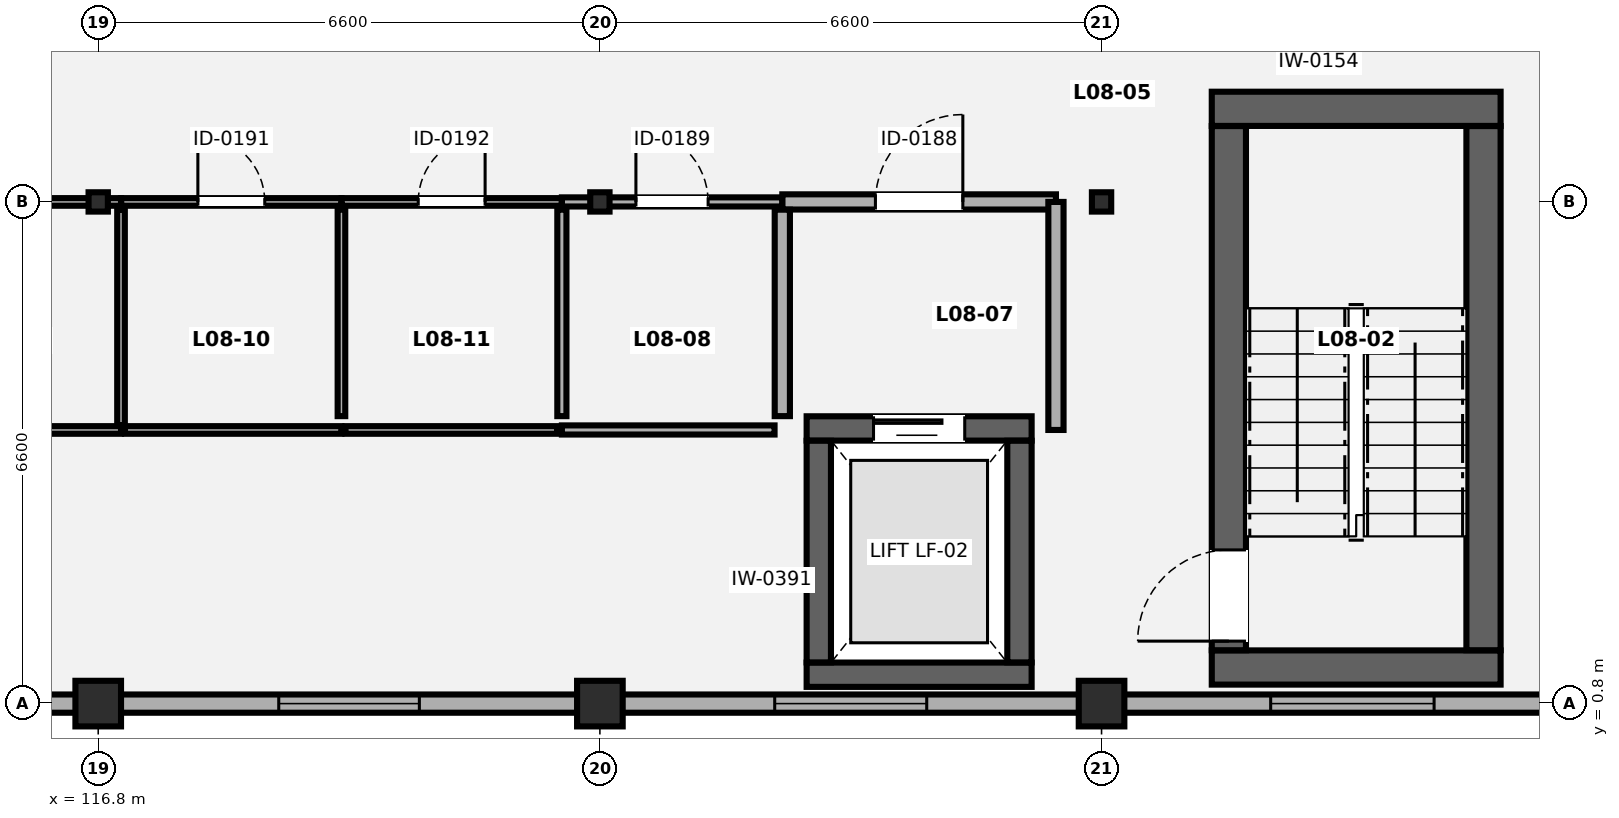
"""IFC4 building model, lengths in metres.
Left out: names, types, materials, properties, quantities, classifications, styles, units other than length and angle.
Written with IfcOpenShell. Run it as: python <this file> out.ifc"""

import sys

from ifc_helpers import new_model, si_unit, direction, frame, frame_2d, origin, origin_2d, place, context, subcontext, project, spatial, rectangle, circle, i_section, extrude, element, fill, save


model = new_model("IFC4")
c1 = context("Model", 3, precision=1e-05, world=origin(), true_north=direction((0.0, 1.0)))
c2 = subcontext(c1, "Body", "Model", "MODEL_VIEW")
j1 = project(units=[si_unit("LENGTHUNIT", "METRE"), si_unit("PLANEANGLEUNIT", "RADIAN")], contexts=[c1])
p1 = place(None, origin())
s1 = spatial("IfcSite", under=j1, at=p1, CompositionType="ELEMENT")
p2 = place(p1, origin())
s2 = spatial("IfcBuilding", under=s1, at=p2, CompositionType="ELEMENT")
p3 = place(p2, frame((0.0, 0.0, 34.3)))
s3 = spatial("IfcBuildingStorey", under=s2, at=p3, CompositionType="ELEMENT", Elevation=34.3)
p4 = place(p3, frame((116.8, 0.8, 0.0), z_axis=(0.0, 0.0, 1.0), x_axis=(1.0, 0.0, 0.0)))
e1 = element("IfcColumn", 1, at=p4, inside=s3, PredefinedType="PILASTER", context=c2, shape_type="SweptSolid", body=[
    extrude(circle(Radius=0.3, at=origin_2d()), origin(), (0.0, 0.0, 1.0), 3.85),
])
p5 = place(p3, frame((116.8, 7.4, 0.0), z_axis=(0.0, 0.0, 1.0), x_axis=(1.0, 0.0, 0.0)))
e2 = element("IfcColumn", 2, at=p5, inside=s3, PredefinedType="COLUMN", context=c2, shape_type="SweptSolid", body=[
    extrude(i_section(OverallWidth=0.254, OverallDepth=0.254, WebThickness=0.009, FlangeThickness=0.014, FilletRadius=0.014, at=origin_2d()), origin(), (0.0, 0.0, 1.0), 3.85),
])
p6 = place(p3, frame((123.4, 0.8, 0.0), z_axis=(0.0, 0.0, 1.0), x_axis=(1.0, 0.0, 0.0)))
e3 = element("IfcColumn", 3, at=p6, inside=s3, PredefinedType="PILASTER", context=c2, shape_type="SweptSolid", body=[
    extrude(circle(Radius=0.3, at=origin_2d()), origin(), (0.0, 0.0, 1.0), 3.85),
])
p7 = place(p3, frame((123.4, 7.4, 0.0), z_axis=(0.0, 0.0, 1.0), x_axis=(1.0, 0.0, 0.0)))
e4 = element("IfcColumn", 4, at=p7, inside=s3, PredefinedType="COLUMN", context=c2, shape_type="SweptSolid", body=[
    extrude(i_section(OverallWidth=0.254, OverallDepth=0.254, WebThickness=0.009, FlangeThickness=0.014, FilletRadius=0.014, at=origin_2d()), origin(), (0.0, 0.0, 1.0), 3.85),
])
p8 = place(p3, frame((130.0, 0.8, 0.0), z_axis=(0.0, 0.0, 1.0), x_axis=(1.0, 0.0, 0.0)))
e5 = element("IfcColumn", 5, at=p8, inside=s3, PredefinedType="PILASTER", context=c2, shape_type="SweptSolid", body=[
    extrude(circle(Radius=0.3, at=origin_2d()), origin(), (0.0, 0.0, 1.0), 3.85),
])
p9 = place(p3, frame((130.0, 7.4, 0.0), z_axis=(0.0, 0.0, 1.0), x_axis=(1.0, 0.0, 0.0)))
e6 = element("IfcColumn", 6, at=p9, inside=s3, PredefinedType="COLUMN", context=c2, shape_type="SweptSolid", body=[
    extrude(i_section(OverallWidth=0.254, OverallDepth=0.254, WebThickness=0.009, FlangeThickness=0.014, FilletRadius=0.014, at=origin_2d()), origin(), (0.0, 0.0, 1.0), 3.85),
])
p10 = place(p3, frame((149.502, 0.8, 0.0), z_axis=(0.0, 0.0, 1.0), x_axis=(-1.0, 0.0, 0.0)))
e7 = element("IfcWall", 7, at=p10, inside=s3, PredefinedType="SOLIDWALL", context=c2, shape_type="SweptSolid", body=[
    extrude(rectangle(XDim=45.604, YDim=0.24, at=frame_2d((22.802, 0.0))), origin(), (0.0, 0.0, 1.0), 3.155),
])
p11 = place(p10, frame((41.827, 0.0, 0.85)))
e8 = element("IfcOpeningElement", 8, at=p11, cuts=e7, PredefinedType="OPENING", context=c2, shape_type="SweptSolid", body=[
    extrude(rectangle(XDim=1.55, YDim=1.4, at=frame_2d((0.775, 0.7))), frame((0.0, 0.13, 0.0), z_axis=(0.0, -1.0, 0.0), x_axis=(1.0, 0.0, 0.0)), (0.0, 0.0, 1.0), 0.26),
])
p12 = place(p10, frame((35.152, 0.0, 0.85)))
e9 = element("IfcOpeningElement", 9, at=p12, cuts=e7, PredefinedType="OPENING", context=c2, shape_type="SweptSolid", body=[
    extrude(rectangle(XDim=1.7, YDim=1.4, at=frame_2d((0.85, 0.7))), frame((0.0, 0.13, 0.0), z_axis=(0.0, -1.0, 0.0), x_axis=(1.0, 0.0, 0.0)), (0.0, 0.0, 1.0), 0.26),
])
p13 = place(p10, frame((28.477, 0.0, 0.85)))
e10 = element("IfcOpeningElement", 10, at=p13, cuts=e7, PredefinedType="OPENING", context=c2, shape_type="SweptSolid", body=[
    extrude(rectangle(XDim=1.85, YDim=1.4, at=frame_2d((0.925, 0.7))), frame((0.0, 0.13, 0.0), z_axis=(0.0, -1.0, 0.0), x_axis=(1.0, 0.0, 0.0)), (0.0, 0.0, 1.0), 0.26),
])
p14 = place(p10, frame((21.802, 0.0, 0.85)))
e11 = element("IfcOpeningElement", 11, at=p14, cuts=e7, PredefinedType="OPENING", context=c2, shape_type="SweptSolid", body=[
    extrude(rectangle(XDim=2.0, YDim=1.4, at=frame_2d((1.0, 0.7))), frame((0.0, 0.13, 0.0), z_axis=(0.0, -1.0, 0.0), x_axis=(1.0, 0.0, 0.0)), (0.0, 0.0, 1.0), 0.26),
])
p15 = place(p10, frame((15.127, 0.0, 0.85)))
e12 = element("IfcOpeningElement", 12, at=p15, cuts=e7, PredefinedType="OPENING", context=c2, shape_type="SweptSolid", body=[
    extrude(rectangle(XDim=2.15, YDim=1.4, at=frame_2d((1.075, 0.7))), frame((0.0, 0.13, 0.0), z_axis=(0.0, -1.0, 0.0), x_axis=(1.0, 0.0, 0.0)), (0.0, 0.0, 1.0), 0.26),
])
p16 = place(p10, frame((8.452, 0.0, 0.85)))
e13 = element("IfcOpeningElement", 13, at=p16, cuts=e7, PredefinedType="OPENING", context=c2, shape_type="SweptSolid", body=[
    extrude(rectangle(XDim=2.3, YDim=1.4, at=frame_2d((1.15, 0.7))), frame((0.0, 0.13, 0.0), z_axis=(0.0, -1.0, 0.0), x_axis=(1.0, 0.0, 0.0)), (0.0, 0.0, 1.0), 0.26),
])
p17 = place(p10, frame((1.777, 0.0, 0.85)))
e14 = element("IfcOpeningElement", 14, at=p17, cuts=e7, PredefinedType="OPENING", context=c2, shape_type="SweptSolid", body=[
    extrude(rectangle(XDim=2.45, YDim=1.4, at=frame_2d((1.225, 0.7))), frame((0.0, 0.13, 0.0), z_axis=(0.0, -1.0, 0.0), x_axis=(1.0, 0.0, 0.0)), (0.0, 0.0, 1.0), 0.26),
])
for number, where, z_axis, x_axis in (
    (15, (131.45, 1.275, 0.0), (0.0, 0.0, 1.0), (1.0, 0.0, 0.0)),
    (16, (131.45, 8.625, 0.0), (0.0, 0.0, 1.0), (1.0, 0.0, 0.0)),
):
    element("IfcWall", number, at=place(p3, frame(where, z_axis=z_axis, x_axis=x_axis)), inside=s3, PredefinedType="SHEAR", context=c2, shape_type="SweptSolid", body=[
        extrude(rectangle(XDim=3.8, YDim=0.45, at=frame_2d((1.9, 0.0))), origin(), (0.0, 0.0, 1.0), 3.67),
    ])
p18 = place(p3, frame((131.675, 1.502, 0.0), z_axis=(0.0, 0.0, 1.0), x_axis=(0.0, 1.0, 0.0)))
e17 = element("IfcWall", 17, at=p18, inside=s3, PredefinedType="SHEAR", context=c2, shape_type="SweptSolid", body=[
    extrude(rectangle(XDim=6.896, YDim=0.45, at=frame_2d((3.448, 0.0))), origin(), (0.0, 0.0, 1.0), 3.67),
])
p19 = place(p18, frame((0.12, 0.0, 0.0)))
e18 = element("IfcOpeningElement", 18, at=p19, cuts=e17, PredefinedType="OPENING", context=c2, shape_type="SweptSolid", body=[
    extrude(rectangle(XDim=1.2, YDim=2.15, at=frame_2d((0.6, 1.075))), frame((0.0, 0.235, 0.0), z_axis=(0.0, -1.0, 0.0), x_axis=(1.0, 0.0, 0.0)), (0.0, 0.0, 1.0), 0.47),
])
p20 = place(p3, frame((135.025, 1.502, 0.0), z_axis=(0.0, 0.0, 1.0), x_axis=(0.0, 1.0, 0.0)))
e19 = element("IfcWall", 19, at=p20, inside=s3, PredefinedType="SHEAR", context=c2, shape_type="SweptSolid", body=[
    extrude(rectangle(XDim=6.896, YDim=0.45, at=frame_2d((3.448, 0.0))), origin(), (0.0, 0.0, 1.0), 3.67),
])
p21 = place(p3, frame((126.12, 1.18, 0.0), z_axis=(0.0, 0.0, 1.0), x_axis=(1.0, 0.0, 0.0)))
e20 = element("IfcWall", 20, at=p21, inside=s3, PredefinedType="SHEAR", context=c2, shape_type="SweptSolid", body=[
    extrude(rectangle(XDim=2.96, YDim=0.32, at=frame_2d((1.48, 0.0))), origin(), (0.0, 0.0, 1.0), 3.67),
])
p22 = place(p3, frame((126.12, 4.42, 0.0), z_axis=(0.0, 0.0, 1.0), x_axis=(1.0, 0.0, 0.0)))
e21 = element("IfcWall", 21, at=p22, inside=s3, PredefinedType="SHEAR", context=c2, shape_type="SweptSolid", body=[
    extrude(rectangle(XDim=2.96, YDim=0.32, at=frame_2d((1.48, 0.0))), origin(), (0.0, 0.0, 1.0), 3.67),
])
p23 = place(p22, frame((0.88, 0.0, 0.0)))
e22 = element("IfcOpeningElement", 22, at=p23, cuts=e21, PredefinedType="OPENING", context=c2, shape_type="SweptSolid", body=[
    extrude(rectangle(XDim=1.2, YDim=2.2, at=frame_2d((0.6, 1.1))), frame((0.0, 0.17, 0.0), z_axis=(0.0, -1.0, 0.0), x_axis=(1.0, 0.0, 0.0)), (0.0, 0.0, 1.0), 0.34),
])
for number, where, z_axis, x_axis in (
    (23, (126.28, 1.342, 0.0), (0.0, 0.0, 1.0), (0.0, 1.0, 0.0)),
    (24, (128.92, 1.342, 0.0), (0.0, 0.0, 1.0), (0.0, 1.0, 0.0)),
):
    element("IfcWall", number, at=place(p3, frame(where, z_axis=z_axis, x_axis=x_axis)), inside=s3, PredefinedType="SHEAR", context=c2, shape_type="SweptSolid", body=[
        extrude(rectangle(XDim=2.916, YDim=0.32, at=frame_2d((1.458, 0.0))), origin(), (0.0, 0.0, 1.0), 3.67),
    ])
p24 = place(p3, frame((125.8, 7.4, 0.0), z_axis=(0.0, 0.0, 1.0), x_axis=(1.0, 0.0, 0.0)))
e25 = element("IfcWall", 25, at=p24, inside=s3, PredefinedType="SOLIDWALL", context=c2, shape_type="SweptSolid", body=[
    extrude(rectangle(XDim=3.6, YDim=0.2, at=frame_2d((1.8, 0.0))), origin(), (0.0, 0.0, 1.0), 2.943),
])
p25 = place(p24, frame((1.225, 0.0, 0.0)))
e26 = element("IfcOpeningElement", 26, at=p25, cuts=e25, PredefinedType="OPENING", context=c2, shape_type="SweptSolid", body=[
    extrude(rectangle(XDim=1.15, YDim=2.15, at=frame_2d((0.575, 1.075))), frame((0.0, 0.11, 0.0), z_axis=(0.0, -1.0, 0.0), x_axis=(1.0, 0.0, 0.0)), (0.0, 0.0, 1.0), 0.22),
])
p26 = place(p3, frame((125.8, 4.582, 0.0), z_axis=(0.0, 0.0, 1.0), x_axis=(0.0, 1.0, 0.0)))
e27 = element("IfcWall", 27, at=p26, inside=s3, PredefinedType="SOLIDWALL", context=c2, shape_type="SweptSolid", body=[
    extrude(rectangle(XDim=2.716, YDim=0.2, at=frame_2d((1.358, 0.0))), origin(), (0.0, 0.0, 1.0), 3.67),
])
p27 = place(p3, frame((129.4, 4.4, 0.0), z_axis=(0.0, 0.0, 1.0), x_axis=(0.0, 1.0, 0.0)))
e28 = element("IfcWall", 28, at=p27, inside=s3, PredefinedType="SOLIDWALL", context=c2, shape_type="SweptSolid", body=[
    extrude(rectangle(XDim=3.0, YDim=0.2, at=frame_2d((1.5, 0.0))), origin(), (0.0, 0.0, 1.0), 3.67),
])
p28 = place(p3, frame((122.9, 4.4, 0.0), z_axis=(0.0, 0.0, 1.0), x_axis=(1.0, 0.0, 0.0)))
e29 = element("IfcWall", 29, at=p28, inside=s3, PredefinedType="PARTITIONING", context=c2, shape_type="SweptSolid", body=[
    extrude(rectangle(XDim=2.798, YDim=0.12, at=frame_2d((1.399, 0.0))), origin(), (0.0, 0.0, 1.0), 3.67),
])
p29 = place(p3, frame((122.9, 7.4, 0.0), z_axis=(0.0, 0.0, 1.0), x_axis=(1.0, 0.0, 0.0)))
e30 = element("IfcWall", 30, at=p29, inside=s3, PredefinedType="PARTITIONING", context=c2, shape_type="SweptSolid", body=[
    extrude(rectangle(XDim=2.898, YDim=0.12, at=frame_2d((1.449, 0.0))), origin(), (0.0, 0.0, 1.0), 2.943),
])
p30 = place(p29, frame((0.974, 0.0, 0.0)))
e31 = element("IfcOpeningElement", 31, at=p30, cuts=e30, PredefinedType="OPENING", context=c2, shape_type="SweptSolid", body=[
    extrude(rectangle(XDim=0.95, YDim=2.1, at=frame_2d((0.475, 1.05))), frame((0.0, 0.07, 0.0), z_axis=(0.0, -1.0, 0.0), x_axis=(1.0, 0.0, 0.0)), (0.0, 0.0, 1.0), 0.14),
])
p31 = place(p3, frame((122.9, 4.582, 0.0), z_axis=(0.0, 0.0, 1.0), x_axis=(0.0, 1.0, 0.0)))
e32 = element("IfcWall", 32, at=p31, inside=s3, PredefinedType="PARTITIONING", context=c2, shape_type="SweptSolid", body=[
    extrude(rectangle(XDim=2.716, YDim=0.12, at=frame_2d((1.358, 0.0))), origin(), (0.0, 0.0, 1.0), 3.67),
])
p32 = place(p3, frame((114.302, 4.4, 0.0), z_axis=(0.0, 0.0, 1.0), x_axis=(1.0, 0.0, 0.0)))
e33 = element("IfcWall", 33, at=p32, inside=s3, PredefinedType="PARTITIONING", context=c2, shape_type="SweptSolid", body=[
    extrude(rectangle(XDim=2.798, YDim=0.1, at=frame_2d((1.399, 0.0))), origin(), (0.0, 0.0, 1.0), 3.67),
])
p33 = place(p3, frame((114.202, 7.4, 0.0), z_axis=(0.0, 0.0, 1.0), x_axis=(1.0, 0.0, 0.0)))
e34 = element("IfcWall", 34, at=p33, inside=s3, PredefinedType="PARTITIONING", context=c2, shape_type="SweptSolid", body=[
    extrude(rectangle(XDim=2.898, YDim=0.1, at=frame_2d((1.449, 0.0))), origin(), (0.0, 0.0, 1.0), 2.943),
])
p34 = place(p33, frame((0.949, 0.0, 0.0)))
e35 = element("IfcOpeningElement", 35, at=p34, cuts=e34, PredefinedType="OPENING", context=c2, shape_type="SweptSolid", body=[
    extrude(rectangle(XDim=1.0, YDim=2.1, at=frame_2d((0.5, 1.05))), frame((0.0, 0.06, 0.0), z_axis=(0.0, -1.0, 0.0), x_axis=(1.0, 0.0, 0.0)), (0.0, 0.0, 1.0), 0.12),
])
p35 = place(p3, frame((117.1, 4.462, 0.0), z_axis=(0.0, 0.0, 1.0), x_axis=(0.0, 1.0, 0.0)))
e36 = element("IfcWall", 36, at=p35, inside=s3, PredefinedType="PARTITIONING", context=c2, shape_type="SweptSolid", body=[
    extrude(rectangle(XDim=2.836, YDim=0.1, at=frame_2d((1.418, 0.0))), origin(), (0.0, 0.0, 1.0), 3.67),
])
p36 = place(p3, frame((117.152, 4.4, 0.0), z_axis=(0.0, 0.0, 1.0), x_axis=(1.0, 0.0, 0.0)))
e37 = element("IfcWall", 37, at=p36, inside=s3, PredefinedType="PARTITIONING", context=c2, shape_type="SweptSolid", body=[
    extrude(rectangle(XDim=2.848, YDim=0.1, at=frame_2d((1.424, 0.0))), origin(), (0.0, 0.0, 1.0), 3.67),
])
p37 = place(p3, frame((117.102, 7.4, 0.0), z_axis=(0.0, 0.0, 1.0), x_axis=(1.0, 0.0, 0.0)))
e38 = element("IfcWall", 38, at=p37, inside=s3, PredefinedType="PARTITIONING", context=c2, shape_type="SweptSolid", body=[
    extrude(rectangle(XDim=2.898, YDim=0.1, at=frame_2d((1.449, 0.0))), origin(), (0.0, 0.0, 1.0), 2.943),
])
p38 = place(p37, frame((1.009, 0.0, 0.0)))
e39 = element("IfcOpeningElement", 39, at=p38, cuts=e38, PredefinedType="OPENING", context=c2, shape_type="SweptSolid", body=[
    extrude(rectangle(XDim=0.88, YDim=2.08, at=frame_2d((0.44, 1.04))), frame((0.0, 0.06, 0.0), z_axis=(0.0, -1.0, 0.0), x_axis=(1.0, 0.0, 0.0)), (0.0, 0.0, 1.0), 0.12),
])
p39 = place(p3, frame((120.0, 4.582, 0.0), z_axis=(0.0, 0.0, 1.0), x_axis=(0.0, 1.0, 0.0)))
e40 = element("IfcWall", 40, at=p39, inside=s3, PredefinedType="PARTITIONING", context=c2, shape_type="SweptSolid", body=[
    extrude(rectangle(XDim=2.716, YDim=0.1, at=frame_2d((1.358, 0.0))), origin(), (0.0, 0.0, 1.0), 3.67),
])
p40 = place(p3, frame((120.052, 4.4, 0.0), z_axis=(0.0, 0.0, 1.0), x_axis=(1.0, 0.0, 0.0)))
e41 = element("IfcWall", 41, at=p40, inside=s3, PredefinedType="PARTITIONING", context=c2, shape_type="SweptSolid", body=[
    extrude(rectangle(XDim=2.786, YDim=0.1, at=frame_2d((1.393, 0.0))), origin(), (0.0, 0.0, 1.0), 3.67),
])
p41 = place(p3, frame((120.002, 7.4, 0.0), z_axis=(0.0, 0.0, 1.0), x_axis=(1.0, 0.0, 0.0)))
e42 = element("IfcWall", 42, at=p41, inside=s3, PredefinedType="PARTITIONING", context=c2, shape_type="SweptSolid", body=[
    extrude(rectangle(XDim=2.896, YDim=0.1, at=frame_2d((1.448, 0.0))), origin(), (0.0, 0.0, 1.0), 2.943),
])
p42 = place(p41, frame((1.008, 0.0, 0.0)))
e43 = element("IfcOpeningElement", 43, at=p42, cuts=e42, PredefinedType="OPENING", context=c2, shape_type="SweptSolid", body=[
    extrude(rectangle(XDim=0.88, YDim=2.08, at=frame_2d((0.44, 1.04))), frame((0.0, 0.06, 0.0), z_axis=(0.0, -1.0, 0.0), x_axis=(1.0, 0.0, 0.0)), (0.0, 0.0, 1.0), 0.12),
])
p43 = place(p13, origin())
e44 = element("IfcWindow", 44, at=p43, inside=s3, PartitioningType="SINGLE_PANEL", PredefinedType="WINDOW", context=c2, shape_type="SweptSolid", body=[
    extrude(rectangle(XDim=1.85, YDim=1.4, at=frame_2d((0.925, 0.7))), frame((0.0, 0.03, 0.0), z_axis=(0.0, -1.0, 0.0), x_axis=(1.0, 0.0, 0.0)), (0.0, 0.0, 1.0), 0.06),
])
fill(e10, e44)
p44 = place(p14, origin())
e45 = element("IfcWindow", 45, at=p44, inside=s3, PartitioningType="SINGLE_PANEL", PredefinedType="WINDOW", context=c2, shape_type="SweptSolid", body=[
    extrude(rectangle(XDim=2.0, YDim=1.4, at=frame_2d((1.0, 0.7))), frame((0.0, 0.03, 0.0), z_axis=(0.0, -1.0, 0.0), x_axis=(1.0, 0.0, 0.0)), (0.0, 0.0, 1.0), 0.06),
])
fill(e11, e45)
p45 = place(p15, origin())
e46 = element("IfcWindow", 46, at=p45, inside=s3, PartitioningType="SINGLE_PANEL", PredefinedType="WINDOW", context=c2, shape_type="SweptSolid", body=[
    extrude(rectangle(XDim=2.15, YDim=1.4, at=frame_2d((1.075, 0.7))), frame((0.0, 0.03, 0.0), z_axis=(0.0, -1.0, 0.0), x_axis=(1.0, 0.0, 0.0)), (0.0, 0.0, 1.0), 0.06),
])
fill(e12, e46)
p46 = place(p19, origin())
e47 = element("IfcDoor", 47, at=p46, inside=s3, OperationType="SINGLE_SWING_LEFT", PredefinedType="DOOR", context=c2, shape_type="SweptSolid", body=[
    extrude(rectangle(XDim=1.2, YDim=2.15, at=frame_2d((0.6, 1.075))), frame((0.0, 0.025, 0.0), z_axis=(0.0, -1.0, 0.0), x_axis=(1.0, 0.0, 0.0)), (0.0, 0.0, 1.0), 0.05),
])
fill(e18, e47)
p47 = place(p23, origin())
e48 = element("IfcDoor", 48, at=p47, inside=s3, OperationType="SLIDING_TO_LEFT", PredefinedType="DOOR", context=c2, shape_type="SweptSolid", body=[
    extrude(rectangle(XDim=1.2, YDim=2.2, at=frame_2d((0.6, 1.1))), frame((0.0, 0.025, 0.0), z_axis=(0.0, -1.0, 0.0), x_axis=(1.0, 0.0, 0.0)), (0.0, 0.0, 1.0), 0.05),
])
fill(e22, e48)
p48 = place(p25, origin())
e49 = element("IfcDoor", 49, at=p48, inside=s3, OperationType="SINGLE_SWING_RIGHT", PredefinedType="DOOR", context=c2, shape_type="SweptSolid", body=[
    extrude(rectangle(XDim=1.15, YDim=2.15, at=frame_2d((0.575, 1.075))), frame((0.0, 0.025, 0.0), z_axis=(0.0, -1.0, 0.0), x_axis=(1.0, 0.0, 0.0)), (0.0, 0.0, 1.0), 0.05),
])
fill(e26, e49)
p49 = place(p30, origin())
e50 = element("IfcDoor", 50, at=p49, inside=s3, OperationType="SINGLE_SWING_LEFT", PredefinedType="DOOR", context=c2, shape_type="SweptSolid", body=[
    extrude(rectangle(XDim=0.95, YDim=2.1, at=frame_2d((0.475, 1.05))), frame((0.0, 0.025, 0.0), z_axis=(0.0, -1.0, 0.0), x_axis=(1.0, 0.0, 0.0)), (0.0, 0.0, 1.0), 0.05),
])
fill(e31, e50)
p50 = place(p38, origin())
e51 = element("IfcDoor", 51, at=p50, inside=s3, OperationType="SINGLE_SWING_LEFT", PredefinedType="DOOR", context=c2, shape_type="SweptSolid", body=[
    extrude(rectangle(XDim=0.88, YDim=2.08, at=frame_2d((0.44, 1.04))), frame((0.0, 0.025, 0.0), z_axis=(0.0, -1.0, 0.0), x_axis=(1.0, 0.0, 0.0)), (0.0, 0.0, 1.0), 0.05),
])
fill(e39, e51)
p51 = place(p42, origin())
e52 = element("IfcDoor", 52, at=p51, inside=s3, OperationType="SINGLE_SWING_RIGHT", PredefinedType="DOOR", context=c2, shape_type="SweptSolid", body=[
    extrude(rectangle(XDim=0.88, YDim=2.08, at=frame_2d((0.44, 1.04))), frame((0.0, 0.025, 0.0), z_axis=(0.0, -1.0, 0.0), x_axis=(1.0, 0.0, 0.0)), (0.0, 0.0, 1.0), 0.05),
])
fill(e43, e52)
save(model, sys.argv[1])
